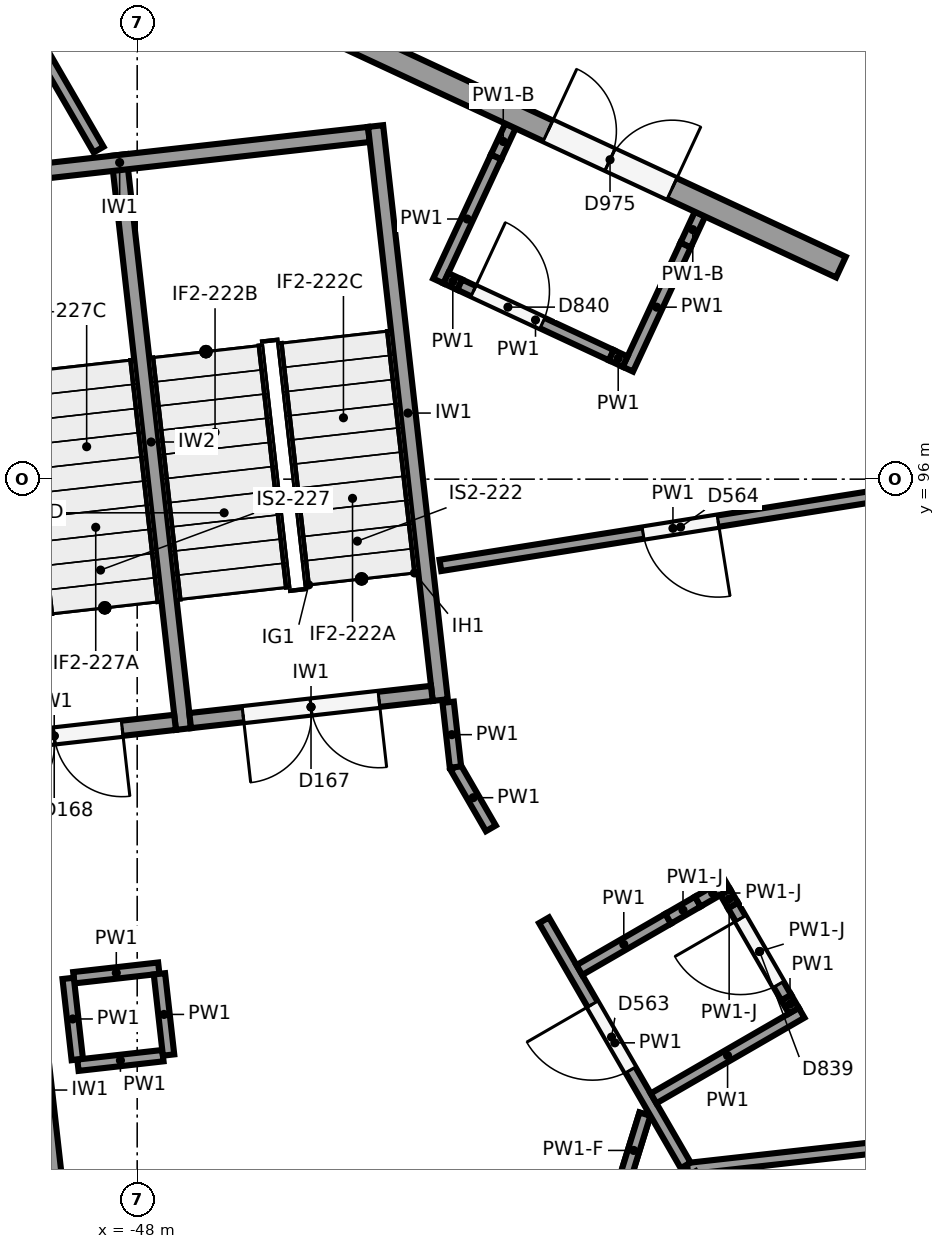
"""IFC4 building model, lengths in metres.
Left out: names, types, materials, properties, quantities, classifications, styles, units other than length and angle.
Written with IfcOpenShell. Run it as: python <this file> out.ifc"""

import sys

from ifc_helpers import new_model, si_unit, direction, frame, frame_2d, origin, origin_2d, place, context, subcontext, project, spatial, rectangle, circle, extrude, element, fill, save


model = new_model("IFC4")
c1 = context("Model", 3, precision=1e-05, world=origin(), true_north=direction((0.0, 1.0)))
c2 = subcontext(c1, "Body", "Model", "MODEL_VIEW")
j1 = project(units=[si_unit("LENGTHUNIT", "METRE"), si_unit("PLANEANGLEUNIT", "RADIAN")], contexts=[c1])
p1 = place(None, origin())
s1 = spatial("IfcSite", under=j1, at=p1, CompositionType="ELEMENT")
p2 = place(p1, origin())
s2 = spatial("IfcBuilding", under=s1, at=p2, CompositionType="ELEMENT")
p3 = place(p2, origin())
s3 = spatial("IfcBuildingStorey", under=s2, at=p3, CompositionType="ELEMENT", Elevation=0.0)
p4 = place(p3, frame((-38.333, 98.6, 0.0), z_axis=(0.0, 0.0, 1.0), x_axis=(1.0, 0.0, 0.0)))
e1 = element("IfcColumn", 1, at=p4, inside=s3, PredefinedType="COLUMN", context=c2, shape_type="SweptSolid", body=[
    extrude(circle(Radius=0.45, at=origin_2d()), origin(), (0.0, 0.0, 1.0), 6.5),
])
p5 = place(p3, frame((-44.683, 91.091, 0.0), z_axis=(0.0, 0.0, 1.0), x_axis=(1.0, 0.0, 0.0)))
e2 = element("IfcColumn", 2, at=p5, inside=s3, PredefinedType="COLUMN", context=c2, shape_type="SweptSolid", body=[
    extrude(circle(Radius=0.55, at=origin_2d()), origin(), (0.0, 0.0, 1.0), 6.5),
])
p6 = place(p3, frame((-51.569, 104.757, 0.0), z_axis=(0.0, 0.0, 1.0), x_axis=(0.906698705786, -0.421778919491, 0.0)))
e3 = element("IfcWall", 3, at=p6, inside=s3, PredefinedType="SOLIDWALL", context=c2, shape_type="SweptSolid", body=[
    extrude(rectangle(XDim=14.148, YDim=0.3, at=frame_2d((7.074, 0.0))), origin(), (0.0, 0.0, 1.0), 4.85),
])
p7 = place(p6, frame((9.897, 0.0, 0.0)))
e4 = element("IfcOpeningElement", 4, at=p7, cuts=e3, PredefinedType="OPENING", context=c2, shape_type="SweptSolid", body=[
    extrude(rectangle(XDim=1.8, YDim=2.4, at=frame_2d((0.9, 1.2))), frame((0.0, 0.16, 0.0), z_axis=(0.0, -1.0, 0.0), x_axis=(1.0, 0.0, 0.0)), (0.0, 0.0, 1.0), 0.32),
])
p8 = place(p3, frame((-44.863, 100.646, 0.0), z_axis=(0.0, 0.0, 1.0), x_axis=(0.111951003472, -0.993713727802, 0.0)))
e5 = element("IfcWall", 5, at=p8, inside=s3, PredefinedType="SHEAR", context=c2, shape_type="SweptSolid", body=[
    extrude(rectangle(XDim=7.6, YDim=0.2, at=frame_2d((3.8, 0.0))), origin(), (0.0, 0.0, 1.0), 6.15),
])
p9 = place(p3, frame((-44.951, 100.535, 0.0), z_axis=(0.0, 0.0, 1.0), x_axis=(-0.993711575492, -0.111970106426, 0.0)))
e6 = element("IfcWall", 6, at=p9, inside=s3, PredefinedType="SHEAR", context=c2, shape_type="SweptSolid", body=[
    extrude(rectangle(XDim=6.6, YDim=0.2, at=frame_2d((3.3, 0.0))), origin(), (0.0, 0.0, 1.0), 6.15),
])
p10 = place(p3, frame((-48.242, 100.265, 0.0), z_axis=(0.0, 0.0, 1.0), x_axis=(0.111954577255, -0.993713325176, 0.0)))
e7 = element("IfcWall", 7, at=p10, inside=s3, PredefinedType="SHEAR", context=c2, shape_type="SweptSolid", body=[
    extrude(rectangle(XDim=7.6, YDim=0.2, at=frame_2d((3.8, 0.0))), origin(), (0.0, 0.0, 1.0), 6.15),
])
p11 = place(p3, frame((-44.123, 93.182, 0.0), z_axis=(0.0, 0.0, 1.0), x_axis=(-0.993717005286, -0.11192190762, 0.0)))
e8 = element("IfcWall", 8, at=p11, inside=s3, PredefinedType="SHEAR", context=c2, shape_type="SweptSolid", body=[
    extrude(rectangle(XDim=3.2, YDim=0.2, at=frame_2d((1.6, 0.0))), origin(), (0.0, 0.0, 1.0), 6.15),
])
p12 = place(p11, frame((0.7, 0.0, 0.0)))
e9 = element("IfcOpeningElement", 9, at=p12, cuts=e8, PredefinedType="OPENING", context=c2, shape_type="SweptSolid", body=[
    extrude(rectangle(XDim=1.8, YDim=2.1, at=frame_2d((0.9, 1.05))), frame((0.0, 0.11, 0.0), z_axis=(0.0, -1.0, 0.0), x_axis=(1.0, 0.0, 0.0)), (0.0, 0.0, 1.0), 0.22),
])
p13 = place(p3, frame((-47.502, 92.801, 0.0), z_axis=(0.0, 0.0, 1.0), x_axis=(-0.993707560215, -0.112005735442, 0.0)))
e10 = element("IfcWall", 10, at=p13, inside=s3, PredefinedType="SHEAR", context=c2, shape_type="SweptSolid", body=[
    extrude(rectangle(XDim=3.2, YDim=0.2, at=frame_2d((1.6, 0.0))), origin(), (0.0, 0.0, 1.0), 6.15),
])
p14 = place(p13, frame((0.7, 0.0, 0.0)))
e11 = element("IfcOpeningElement", 11, at=p14, cuts=e10, PredefinedType="OPENING", context=c2, shape_type="SweptSolid", body=[
    extrude(rectangle(XDim=1.8, YDim=2.1, at=frame_2d((0.9, 1.05))), frame((0.0, 0.11, 0.0), z_axis=(0.0, -1.0, 0.0), x_axis=(1.0, 0.0, 0.0)), (0.0, 0.0, 1.0), 0.22),
])
p15 = place(p3, frame((-49.389, 89.454, 0.0), z_axis=(0.0, 0.0, 1.0), x_axis=(0.111976588553, -0.993710845073, 0.0)))
e12 = element("IfcWall", 12, at=p15, inside=s3, PredefinedType="SHEAR", context=c2, shape_type="SweptSolid", body=[
    extrude(rectangle(XDim=3.0, YDim=0.2, at=frame_2d((1.5, 0.0))), origin(), (0.0, 0.0, 1.0), 6.15),
])
p16 = place(p3, frame((-40.758, 86.929, 0.0), z_axis=(0.0, 0.0, 1.0), x_axis=(0.993792986052, 0.111245228541, 0.0)))
e13 = element("IfcWall", 13, at=p16, inside=s3, PredefinedType="PARTITIONING", context=c2, shape_type="SweptSolid", body=[
    extrude(rectangle(XDim=7.146, YDim=0.15, at=frame_2d((3.573, 0.0))), origin(), (0.0, 0.0, 1.0), 6.15),
])
p17 = place(p3, frame((-37.891, 95.841, 0.0), z_axis=(0.0, 0.0, 1.0), x_axis=(-0.987522859615, -0.157475717929, 0.0)))
e14 = element("IfcWall", 14, at=p17, inside=s3, PredefinedType="PARTITIONING", context=c2, shape_type="SweptSolid", body=[
    extrude(rectangle(XDim=6.197, YDim=0.15, at=frame_2d((3.098, 0.0))), origin(), (0.0, 0.0, 1.0), 6.15),
])
p18 = place(p17, frame((2.497, 0.0, 0.0)))
e15 = element("IfcOpeningElement", 15, at=p18, cuts=e14, PredefinedType="OPENING", context=c2, shape_type="SweptSolid", body=[
    extrude(rectangle(XDim=1.0, YDim=2.1, at=frame_2d((0.5, 1.05))), frame((0.0, 0.085, 0.0), z_axis=(0.0, -1.0, 0.0), x_axis=(1.0, 0.0, 0.0)), (0.0, 0.0, 1.0), 0.17),
])
p19 = place(p3, frame((-40.783, 86.972, 0.0), z_axis=(0.0, 0.0, 1.0), x_axis=(-0.50040316576, 0.865792510765, 0.0)))
e16 = element("IfcWall", 16, at=p19, inside=s3, PredefinedType="PARTITIONING", context=c2, shape_type="SweptSolid", body=[
    extrude(rectangle(XDim=3.725, YDim=0.15, at=frame_2d((1.863, 0.0))), origin(), (0.0, 0.0, 1.0), 6.15),
])
p20 = place(p19, frame((1.45, 0.0, 0.0)))
e17 = element("IfcOpeningElement", 17, at=p20, cuts=e16, PredefinedType="OPENING", context=c2, shape_type="SweptSolid", body=[
    extrude(rectangle(XDim=1.0, YDim=2.1, at=frame_2d((0.5, 1.05))), frame((0.0, 0.085, 0.0), z_axis=(0.0, -1.0, 0.0), x_axis=(1.0, 0.0, 0.0)), (0.0, 0.0, 1.0), 0.17),
])
p21 = place(p3, frame((-43.346, 91.406, 0.0), z_axis=(0.0, 0.0, 1.0), x_axis=(-0.500395505551, 0.865796938101, 0.0)))
e18 = element("IfcWall", 18, at=p21, inside=s3, PredefinedType="PARTITIONING", context=c2, shape_type="SweptSolid", body=[
    extrude(rectangle(XDim=0.931, YDim=0.15, at=frame_2d((0.466, 0.0))), origin(), (0.0, 0.0, 1.0), 6.15),
])
p22 = place(p3, frame((-43.812, 92.212, 0.0), z_axis=(0.0, 0.0, 1.0), x_axis=(-0.112117924941, 0.993694908363, 0.0)))
e19 = element("IfcWall", 19, at=p22, inside=s3, PredefinedType="PARTITIONING", context=c2, shape_type="SweptSolid", body=[
    extrude(rectangle(XDim=0.858, YDim=0.15, at=frame_2d((0.429, 0.0))), origin(), (0.0, 0.0, 1.0), 6.15),
])
p23 = place(p3, frame((-48.508, 100.336, 0.0), z_axis=(0.0, 0.0, 1.0), x_axis=(-0.500439359674, 0.865771590715, 0.0)))
e20 = element("IfcWall", 20, at=p23, inside=s3, PredefinedType="PARTITIONING", context=c2, shape_type="SweptSolid", body=[
    extrude(rectangle(XDim=3.822, YDim=0.15, at=frame_2d((1.911, 0.0))), origin(), (0.0, 0.0, 1.0), 6.15),
])
p24 = place(p3, frame((-47.716, 89.567, 0.0), z_axis=(0.0, 0.0, 1.0), x_axis=(-0.993710504932, -0.11197960702, 0.0)))
e21 = element("IfcWall", 21, at=p24, inside=s3, PredefinedType="PARTITIONING", context=c2, shape_type="SweptSolid", body=[
    extrude(rectangle(XDim=1.125, YDim=0.15, at=frame_2d((0.562, 0.0))), origin(), (0.0, 0.0, 1.0), 6.15),
])
p25 = place(p3, frame((-48.908, 89.432, 0.0), z_axis=(0.0, 0.0, 1.0), x_axis=(0.111951742856, -0.993713644503, 0.0)))
e22 = element("IfcWall", 22, at=p25, inside=s3, PredefinedType="PARTITIONING", context=c2, shape_type="SweptSolid", body=[
    extrude(rectangle(XDim=1.075, YDim=0.15, at=frame_2d((0.538, 0.0))), origin(), (0.0, 0.0, 1.0), 6.15),
])
p26 = place(p3, frame((-48.78, 88.29, 0.0), z_axis=(0.0, 0.0, 1.0), x_axis=(0.993710504932, 0.11197960702, 0.0)))
e23 = element("IfcWall", 23, at=p26, inside=s3, PredefinedType="PARTITIONING", context=c2, shape_type="SweptSolid", body=[
    extrude(rectangle(XDim=1.125, YDim=0.15, at=frame_2d((0.562, 0.0))), origin(), (0.0, 0.0, 1.0), 6.15),
])
p27 = place(p3, frame((-47.587, 88.424, 0.0), z_axis=(0.0, 0.0, 1.0), x_axis=(-0.111951742856, 0.993713644503, 0.0)))
e24 = element("IfcWall", 24, at=p27, inside=s3, PredefinedType="PARTITIONING", context=c2, shape_type="SweptSolid", body=[
    extrude(rectangle(XDim=1.075, YDim=0.15, at=frame_2d((0.538, 0.0))), origin(), (0.0, 0.0, 1.0), 6.15),
])
p28 = place(p3, frame((-41.206, 87.854, 0.0), z_axis=(0.0, 0.0, 1.0), x_axis=(0.865775232905, 0.500433058548, 0.0)))
e25 = element("IfcWall", 25, at=p28, inside=s3, PredefinedType="PARTITIONING", context=c2, shape_type="SweptSolid", body=[
    extrude(rectangle(XDim=2.25, YDim=0.15, at=frame_2d((1.125, 0.0))), origin(), (0.0, 0.0, 1.0), 6.15),
])
p29 = place(p3, frame((-42.182, 89.542, 0.0), z_axis=(0.0, 0.0, 1.0), x_axis=(0.865772787536, 0.50043728914, 0.0)))
e26 = element("IfcWall", 26, at=p29, inside=s3, PredefinedType="PARTITIONING", context=c2, shape_type="SweptSolid", body=[
    extrude(rectangle(XDim=1.35, YDim=0.15, at=frame_2d((0.675, 0.0))), origin(), (0.0, 0.0, 1.0), 6.15),
])
p30 = place(p3, frame((-41.013, 90.217, 0.0), z_axis=(0.0, 0.0, 1.0), x_axis=(0.865896406789, 0.500223362819, 0.0)))
e27 = element("IfcWall", 27, at=p30, inside=s3, PredefinedType="PARTITIONING", context=c2, shape_type="SweptSolid", body=[
    extrude(rectangle(XDim=0.45, YDim=0.15, at=frame_2d((0.225, 0.0))), origin(), (0.0, 0.0, 1.0), 5.05),
])
p31 = place(p3, frame((-40.624, 90.442, 0.0), z_axis=(0.0, 0.0, 1.0), x_axis=(0.865661377728, 0.500629982232, 0.0)))
e28 = element("IfcWall", 28, at=p31, inside=s3, PredefinedType="PARTITIONING", context=c2, shape_type="SweptSolid", body=[
    extrude(rectangle(XDim=0.45, YDim=0.15, at=frame_2d((0.225, 0.0))), origin(), (0.0, 0.0, 1.0), 5.05),
])
p32 = place(p3, frame((-39.361, 89.007, 0.0), z_axis=(0.0, 0.0, 1.0), x_axis=(-0.500603037456, 0.865676959893, 0.0)))
e29 = element("IfcWall", 29, at=p32, inside=s3, PredefinedType="PARTITIONING", context=c2, shape_type="SweptSolid", body=[
    extrude(rectangle(XDim=0.2, YDim=0.15, at=frame_2d((0.1, 0.0))), origin(), (0.0, 0.0, 1.0), 6.15),
])
p33 = place(p3, frame((-39.461, 89.18, 0.0), z_axis=(0.0, 0.0, 1.0), x_axis=(-0.500451896662, 0.865764343876, 0.0)))
e30 = element("IfcWall", 30, at=p33, inside=s3, PredefinedType="PARTITIONING", context=c2, shape_type="SweptSolid", body=[
    extrude(rectangle(XDim=1.4, YDim=0.15, at=frame_2d((0.7, 0.0))), origin(), (0.0, 0.0, 1.0), 5.05),
])
p34 = place(p33, frame((0.2, 0.0, 0.0)))
e31 = element("IfcOpeningElement", 31, at=p34, cuts=e30, PredefinedType="OPENING", context=c2, shape_type="SweptSolid", body=[
    extrude(rectangle(XDim=1.0, YDim=2.1, at=frame_2d((0.5, 1.05))), frame((0.0, 0.085, 0.0), z_axis=(0.0, -1.0, 0.0), x_axis=(1.0, 0.0, 0.0)), (0.0, 0.0, 1.0), 0.17),
])
p35 = place(p3, frame((-40.162, 90.392, 0.0), z_axis=(0.0, 0.0, 1.0), x_axis=(-0.500603037456, 0.865676959893, 0.0)))
e32 = element("IfcWall", 32, at=p35, inside=s3, PredefinedType="PARTITIONING", context=c2, shape_type="SweptSolid", body=[
    extrude(rectangle(XDim=0.2, YDim=0.15, at=frame_2d((0.1, 0.0))), origin(), (0.0, 0.0, 1.0), 5.05),
])
p36 = place(p3, frame((-43.089, 100.647, 0.0), z_axis=(0.0, 0.0, 1.0), x_axis=(-0.421429993288, -0.906860937938, 0.0)))
e33 = element("IfcWall", 33, at=p36, inside=s3, PredefinedType="PARTITIONING", context=c2, shape_type="SweptSolid", body=[
    extrude(rectangle(XDim=0.45, YDim=0.15, at=frame_2d((0.225, 0.0))), origin(), (0.0, 0.0, 1.0), 4.85),
])
p37 = place(p3, frame((-43.279, 100.239, 0.0), z_axis=(0.0, 0.0, 1.0), x_axis=(-0.421860420743, -0.906660788504, 0.0)))
e34 = element("IfcWall", 34, at=p37, inside=s3, PredefinedType="PARTITIONING", context=c2, shape_type="SweptSolid", body=[
    extrude(rectangle(XDim=1.8, YDim=0.15, at=frame_2d((0.9, 0.0))), origin(), (0.0, 0.0, 1.0), 6.15),
])
p38 = place(p3, frame((-40.595, 99.487, 0.0), z_axis=(0.0, 0.0, 1.0), x_axis=(-0.42163737055, -0.90676453821, 0.0)))
e35 = element("IfcWall", 35, at=p38, inside=s3, PredefinedType="PARTITIONING", context=c2, shape_type="SweptSolid", body=[
    extrude(rectangle(XDim=0.45, YDim=0.15, at=frame_2d((0.225, 0.0))), origin(), (0.0, 0.0, 1.0), 4.85),
])
p39 = place(p3, frame((-40.785, 99.079, 0.0), z_axis=(0.0, 0.0, 1.0), x_axis=(-0.421697036053, -0.906736791899, 0.0)))
e36 = element("IfcWall", 36, at=p39, inside=s3, PredefinedType="PARTITIONING", context=c2, shape_type="SweptSolid", body=[
    extrude(rectangle(XDim=1.8, YDim=0.15, at=frame_2d((0.9, 0.0))), origin(), (0.0, 0.0, 1.0), 6.15),
])
p40 = place(p3, frame((-43.938, 98.643, 0.0), z_axis=(0.0, 0.0, 1.0), x_axis=(0.906775442705, -0.421613918778, 0.0)))
e37 = element("IfcWall", 37, at=p40, inside=s3, PredefinedType="PARTITIONING", context=c2, shape_type="SweptSolid", body=[
    extrude(rectangle(XDim=0.2, YDim=0.15, at=frame_2d((0.1, 0.0))), origin(), (0.0, 0.0, 1.0), 6.15),
])
p41 = place(p3, frame((-43.757, 98.559, 0.0), z_axis=(0.0, 0.0, 1.0), x_axis=(0.906698414225, -0.421779546258, 0.0)))
e38 = element("IfcWall", 38, at=p41, inside=s3, PredefinedType="PARTITIONING", context=c2, shape_type="SweptSolid", body=[
    extrude(rectangle(XDim=2.2, YDim=0.15, at=frame_2d((1.1, 0.0))), origin(), (0.0, 0.0, 1.0), 6.15),
])
p42 = place(p41, frame((0.2, 0.0, 0.0)))
e39 = element("IfcOpeningElement", 39, at=p42, cuts=e38, PredefinedType="OPENING", context=c2, shape_type="SweptSolid", body=[
    extrude(rectangle(XDim=1.0, YDim=2.1, at=frame_2d((0.5, 1.05))), frame((0.0, 0.085, 0.0), z_axis=(0.0, -1.0, 0.0), x_axis=(1.0, 0.0, 0.0)), (0.0, 0.0, 1.0), 0.17),
])
p43 = place(p3, frame((-41.762, 97.631, 0.0), z_axis=(0.0, 0.0, 1.0), x_axis=(0.906775442705, -0.421613918778, 0.0)))
e40 = element("IfcWall", 40, at=p43, inside=s3, PredefinedType="PARTITIONING", context=c2, shape_type="SweptSolid", body=[
    extrude(rectangle(XDim=0.2, YDim=0.15, at=frame_2d((0.1, 0.0))), origin(), (0.0, 0.0, 1.0), 6.15),
])
p44 = place(p3, frame((-41.32, 87.646, 0.0), z_axis=(0.0, 0.0, 1.0), x_axis=(-0.295926199313, -0.955210806346, 0.0)))
e41 = element("IfcWall", 41, at=p44, inside=s3, PredefinedType="PARTITIONING", context=c2, shape_type="SweptSolid", body=[
    extrude(rectangle(XDim=2.582, YDim=0.15, at=frame_2d((1.291, 0.0))), origin(), (0.0, 0.0, 1.0), 5.25),
])
p45 = place(p44, frame((1.05, 0.0, 0.0)))
e42 = element("IfcOpeningElement", 42, at=p45, cuts=e41, PredefinedType="OPENING", context=c2, shape_type="SweptSolid", body=[
    extrude(rectangle(XDim=1.2, YDim=2.1, at=frame_2d((0.6, 1.05))), frame((0.0, 0.085, 0.0), z_axis=(0.0, -1.0, 0.0), x_axis=(1.0, 0.0, 0.0)), (0.0, 0.0, 1.0), 0.17),
])
p46 = place(p3, frame((-41.32, 87.646, 5.25), z_axis=(0.0, 0.0, 1.0), x_axis=(-0.295938375574, -0.955207034031, 0.0)))
e43 = element("IfcWall", 43, at=p46, inside=s3, PredefinedType="PARTITIONING", context=c2, shape_type="SweptSolid", body=[
    extrude(rectangle(XDim=1.0, YDim=0.15, at=frame_2d((0.5, 0.0))), origin(), (0.0, 0.0, 1.0), 0.9),
])
p47 = place(p7, origin())
e44 = element("IfcDoor", 44, at=p47, inside=s3, OperationType="DOUBLE_DOOR_SINGLE_SWING", PredefinedType="DOOR", context=c2, shape_type="SweptSolid", body=[
    extrude(rectangle(XDim=1.8, YDim=2.4, at=frame_2d((0.9, 1.2))), frame((0.0, 0.025, 0.0), z_axis=(0.0, -1.0, 0.0), x_axis=(1.0, 0.0, 0.0)), (0.0, 0.0, 1.0), 0.05),
])
fill(e4, e44)
p48 = place(p12, origin())
e45 = element("IfcDoor", 45, at=p48, inside=s3, OperationType="DOUBLE_DOOR_SINGLE_SWING", PredefinedType="DOOR", context=c2, shape_type="SweptSolid", body=[
    extrude(rectangle(XDim=1.8, YDim=2.1, at=frame_2d((0.9, 1.05))), frame((0.0, 0.025, 0.0), z_axis=(0.0, -1.0, 0.0), x_axis=(1.0, 0.0, 0.0)), (0.0, 0.0, 1.0), 0.05),
])
fill(e9, e45)
p49 = place(p14, origin())
e46 = element("IfcDoor", 46, at=p49, inside=s3, OperationType="DOUBLE_DOOR_SINGLE_SWING", PredefinedType="DOOR", context=c2, shape_type="SweptSolid", body=[
    extrude(rectangle(XDim=1.8, YDim=2.1, at=frame_2d((0.9, 1.05))), frame((0.0, 0.025, 0.0), z_axis=(0.0, -1.0, 0.0), x_axis=(1.0, 0.0, 0.0)), (0.0, 0.0, 1.0), 0.05),
])
fill(e11, e46)
p50 = place(p18, origin())
e47 = element("IfcDoor", 47, at=p50, inside=s3, OperationType="SINGLE_SWING_LEFT", PredefinedType="DOOR", context=c2, shape_type="SweptSolid", body=[
    extrude(rectangle(XDim=1.0, YDim=2.1, at=frame_2d((0.5, 1.05))), frame((0.0, 0.025, 0.0), z_axis=(0.0, -1.0, 0.0), x_axis=(1.0, 0.0, 0.0)), (0.0, 0.0, 1.0), 0.05),
])
fill(e15, e47)
p51 = place(p20, origin())
e48 = element("IfcDoor", 48, at=p51, inside=s3, OperationType="SINGLE_SWING_RIGHT", PredefinedType="DOOR", context=c2, shape_type="SweptSolid", body=[
    extrude(rectangle(XDim=1.0, YDim=2.1, at=frame_2d((0.5, 1.05))), frame((0.0, 0.025, 0.0), z_axis=(0.0, -1.0, 0.0), x_axis=(1.0, 0.0, 0.0)), (0.0, 0.0, 1.0), 0.05),
])
fill(e17, e48)
p52 = place(p34, origin())
e49 = element("IfcDoor", 49, at=p52, inside=s3, OperationType="SINGLE_SWING_RIGHT", PredefinedType="DOOR", context=c2, shape_type="SweptSolid", body=[
    extrude(rectangle(XDim=1.0, YDim=2.1, at=frame_2d((0.5, 1.05))), frame((0.0, 0.025, 0.0), z_axis=(0.0, -1.0, 0.0), x_axis=(1.0, 0.0, 0.0)), (0.0, 0.0, 1.0), 0.05),
])
fill(e31, e49)
p53 = place(p42, origin())
e50 = element("IfcDoor", 50, at=p53, inside=s3, OperationType="SINGLE_SWING_LEFT", PredefinedType="DOOR", context=c2, shape_type="SweptSolid", body=[
    extrude(rectangle(XDim=1.0, YDim=2.1, at=frame_2d((0.5, 1.05))), frame((0.0, 0.025, 0.0), z_axis=(0.0, -1.0, 0.0), x_axis=(1.0, 0.0, 0.0)), (0.0, 0.0, 1.0), 0.05),
])
fill(e39, e50)
save(model, sys.argv[1])
